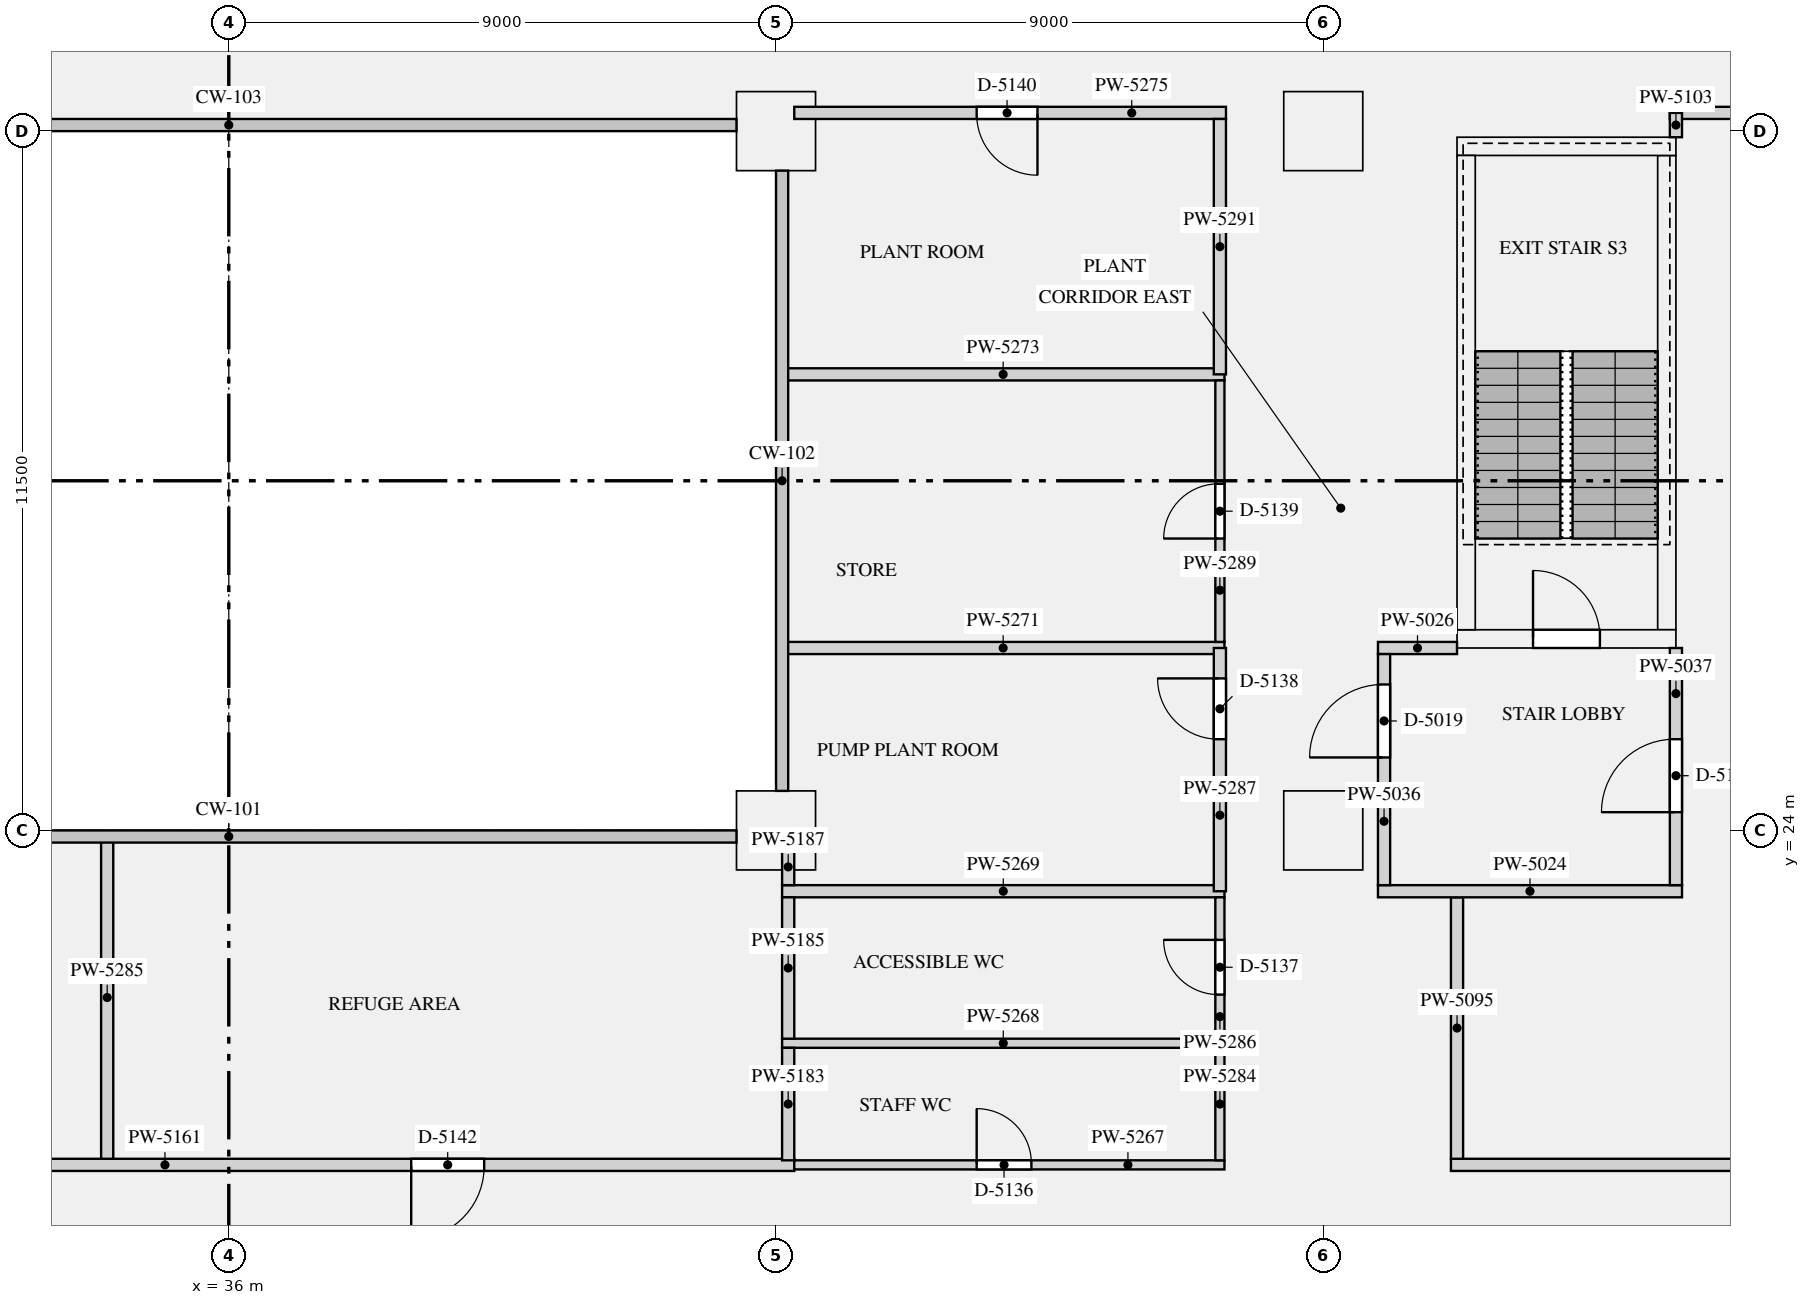
"""IFC4 building model, lengths in metres.
Left out: names, types, materials, properties, quantities, classifications, styles, units other than length and angle.
Written with IfcOpenShell. Run it as: python <this file> out.ifc"""

import sys

from ifc_helpers import new_model, si_unit, direction, frame, frame_2d, origin, origin_2d, place, context, subcontext, project, spatial, rectangle, extrude, element, fill, save


model = new_model("IFC4")
c1 = context("Model", 3, precision=1e-05, world=origin(), true_north=direction((0.0, 1.0)))
c2 = subcontext(c1, "Body", "Model", "MODEL_VIEW")
j1 = project(units=[si_unit("LENGTHUNIT", "METRE"), si_unit("PLANEANGLEUNIT", "RADIAN")], contexts=[c1])
p1 = place(None, origin())
s1 = spatial("IfcSite", under=j1, at=p1, CompositionType="ELEMENT")
p2 = place(p1, origin())
s2 = spatial("IfcBuilding", under=s1, at=p2, CompositionType="ELEMENT")
p3 = place(p2, frame((0.0, 0.0, 137.1)))
s3 = spatial("IfcBuildingStorey", under=s2, at=p3, CompositionType="ELEMENT", Elevation=137.1)
for number, where, z_axis, x_axis in (
    (1, (45.0, 24.0, 0.0), (0.0, 0.0, 1.0), (1.0, 0.0, 0.0)),
    (2, (54.0, 24.0, 0.0), (0.0, 0.0, 1.0), (1.0, 0.0, 0.0)),
    (3, (45.0, 35.5, 0.0), (0.0, 0.0, 1.0), (1.0, 0.0, 0.0)),
    (4, (54.0, 35.5, 0.0), (0.0, 0.0, 1.0), (1.0, 0.0, 0.0)),
):
    element("IfcColumn", number, at=place(p3, frame(where, z_axis=z_axis, x_axis=x_axis)), inside=s3, PredefinedType="COLUMN", context=c2, shape_type="SweptSolid", body=[
        extrude(rectangle(XDim=1.3, YDim=1.3, at=origin_2d()), origin(), (0.0, 0.0, 1.0), 4.2),
    ])
p4 = place(p3, frame((56.2, 27.15, 0.0), z_axis=(0.0, 0.0, 1.0), x_axis=(1.0, 0.0, 0.0)))
e5 = element("IfcWall", 5, at=p4, inside=s3, PredefinedType="SHEAR", context=c2, shape_type="SweptSolid", body=[
    extrude(rectangle(XDim=3.6, YDim=0.3, at=frame_2d((1.8, 0.0))), origin(), (0.0, 0.0, 1.0), 4.2),
])
p5 = place(p4, frame((1.25, 0.0, 0.0)))
e6 = element("IfcOpeningElement", 6, at=p5, cuts=e5, PredefinedType="OPENING", context=c2, shape_type="SweptSolid", body=[
    extrude(rectangle(XDim=1.1, YDim=2.1, at=frame_2d((0.55, 1.05))), frame((0.0, 0.16, 0.0), z_axis=(0.0, -1.0, 0.0), x_axis=(1.0, 0.0, 0.0)), (0.0, 0.0, 1.0), 0.32),
])
p6 = place(p3, frame((56.2, 35.25, 0.0), z_axis=(0.0, 0.0, 1.0), x_axis=(1.0, 0.0, 0.0)))
e7 = element("IfcWall", 7, at=p6, inside=s3, PredefinedType="SHEAR", context=c2, shape_type="SweptSolid", body=[
    extrude(rectangle(XDim=3.6, YDim=0.3, at=frame_2d((1.8, 0.0))), origin(), (0.0, 0.0, 1.0), 4.2),
])
for number, where, z_axis, x_axis in (
    (8, (56.35, 27.3, 0.0), (0.0, 0.0, 1.0), (0.0, 1.0, 0.0)),
    (9, (59.65, 27.3, 0.0), (0.0, 0.0, 1.0), (0.0, 1.0, 0.0)),
):
    element("IfcWall", number, at=place(p3, frame(where, z_axis=z_axis, x_axis=x_axis)), inside=s3, PredefinedType="SHEAR", context=c2, shape_type="SweptSolid", body=[
        extrude(rectangle(XDim=7.8, YDim=0.3, at=frame_2d((3.9, 0.0))), origin(), (0.0, 0.0, 1.0), 4.2),
    ])
p7 = place(p3, frame((54.9, 23.0, 0.0), z_axis=(0.0, 0.0, 1.0), x_axis=(1.0, 0.0, 0.0)))
e10 = element("IfcWall", 10, at=p7, inside=s3, PredefinedType="PARTITIONING", context=c2, shape_type="SweptSolid", body=[
    extrude(rectangle(XDim=5.0, YDim=0.2, at=frame_2d((2.5, 0.0))), origin(), (0.0, 0.0, 1.0), 3.7),
])
p8 = place(p3, frame((54.9, 27.0, 0.0), z_axis=(0.0, 0.0, 1.0), x_axis=(1.0, 0.0, 0.0)))
e11 = element("IfcWall", 11, at=p8, inside=s3, PredefinedType="PARTITIONING", context=c2, shape_type="SweptSolid", body=[
    extrude(rectangle(XDim=1.3, YDim=0.2, at=frame_2d((0.65, 0.0))), origin(), (0.0, 0.0, 1.0), 3.7),
])
p9 = place(p3, frame((55.0, 23.1, 0.0), z_axis=(0.0, 0.0, 1.0), x_axis=(0.0, 1.0, 0.0)))
e12 = element("IfcWall", 12, at=p9, inside=s3, PredefinedType="PARTITIONING", context=c2, shape_type="SweptSolid", body=[
    extrude(rectangle(XDim=3.8, YDim=0.2, at=frame_2d((1.9, 0.0))), origin(), (0.0, 0.0, 1.0), 3.7),
])
p10 = place(p9, frame((2.1, 0.0, 0.0)))
e13 = element("IfcOpeningElement", 13, at=p10, cuts=e12, PredefinedType="OPENING", context=c2, shape_type="SweptSolid", body=[
    extrude(rectangle(XDim=1.2, YDim=2.1, at=frame_2d((0.6, 1.05))), frame((0.0, 0.11, 0.0), z_axis=(0.0, -1.0, 0.0), x_axis=(1.0, 0.0, 0.0)), (0.0, 0.0, 1.0), 0.22),
])
p11 = place(p3, frame((59.8, 23.1, 0.0), z_axis=(0.0, 0.0, 1.0), x_axis=(0.0, 1.0, 0.0)))
e14 = element("IfcWall", 14, at=p11, inside=s3, PredefinedType="PARTITIONING", context=c2, shape_type="SweptSolid", body=[
    extrude(rectangle(XDim=3.9, YDim=0.2, at=frame_2d((1.95, 0.0))), origin(), (0.0, 0.0, 1.0), 3.7),
])
p12 = place(p11, frame((1.2, 0.0, 0.0)))
e15 = element("IfcOpeningElement", 15, at=p12, cuts=e14, PredefinedType="OPENING", context=c2, shape_type="SweptSolid", body=[
    extrude(rectangle(XDim=1.2, YDim=2.1, at=frame_2d((0.6, 1.05))), frame((0.0, 0.11, 0.0), z_axis=(0.0, -1.0, 0.0), x_axis=(1.0, 0.0, 0.0)), (0.0, 0.0, 1.0), 0.22),
])
p13 = place(p3, frame((26.7, 18.5, 0.0), z_axis=(0.0, 0.0, 1.0), x_axis=(1.0, 0.0, 0.0)))
e16 = element("IfcWall", 16, at=p13, inside=s3, PredefinedType="PARTITIONING", context=c2, shape_type="SweptSolid", body=[
    extrude(rectangle(XDim=18.6, YDim=0.2, at=frame_2d((9.3, 0.0))), origin(), (0.0, 0.0, 1.0), 3.7),
])
p14 = place(p13, frame((3.2, 0.0, 0.0)))
e17 = element("IfcOpeningElement", 17, at=p14, cuts=e16, PredefinedType="OPENING", context=c2, shape_type="SweptSolid", body=[
    extrude(rectangle(XDim=1.0, YDim=2.1, at=frame_2d((0.5, 1.05))), frame((0.0, 0.11, 0.0), z_axis=(0.0, -1.0, 0.0), x_axis=(1.0, 0.0, 0.0)), (0.0, 0.0, 1.0), 0.22),
])
p15 = place(p13, frame((12.3, 0.0, 0.0)))
e18 = element("IfcOpeningElement", 18, at=p15, cuts=e16, PredefinedType="OPENING", context=c2, shape_type="SweptSolid", body=[
    extrude(rectangle(XDim=1.2, YDim=2.1, at=frame_2d((0.6, 1.05))), frame((0.0, 0.11, 0.0), z_axis=(0.0, -1.0, 0.0), x_axis=(1.0, 0.0, 0.0)), (0.0, 0.0, 1.0), 0.22),
])
p16 = place(p3, frame((56.1, 18.5, 0.0), z_axis=(0.0, 0.0, 1.0), x_axis=(1.0, 0.0, 0.0)))
e19 = element("IfcWall", 19, at=p16, inside=s3, PredefinedType="PARTITIONING", context=c2, shape_type="SweptSolid", body=[
    extrude(rectangle(XDim=17.81, YDim=0.2, at=frame_2d((8.905, 0.0))), origin(), (0.0, 0.0, 1.0), 3.7),
])
p17 = place(p3, frame((45.3, 18.5, 0.0), z_axis=(0.0, 0.0, 1.0), x_axis=(1.0, 0.0, 0.0)))
e20 = element("IfcWall", 20, at=p17, inside=s3, PredefinedType="PARTITIONING", context=c2, shape_type="SweptSolid", body=[
    extrude(rectangle(XDim=7.075, YDim=0.15, at=frame_2d((3.538, 0.0))), origin(), (0.0, 0.0, 1.0), 3.7),
])
p18 = place(p17, frame((3.0, 0.0, 0.0)))
e21 = element("IfcOpeningElement", 21, at=p18, cuts=e20, PredefinedType="OPENING", context=c2, shape_type="SweptSolid", body=[
    extrude(rectangle(XDim=0.9, YDim=2.1, at=frame_2d((0.45, 1.05))), frame((0.0, 0.085, 0.0), z_axis=(0.0, -1.0, 0.0), x_axis=(1.0, 0.0, 0.0)), (0.0, 0.0, 1.0), 0.17),
])
p19 = place(p3, frame((45.1, 20.5, 0.0), z_axis=(0.0, 0.0, 1.0), x_axis=(1.0, 0.0, 0.0)))
e22 = element("IfcWall", 22, at=p19, inside=s3, PredefinedType="PARTITIONING", context=c2, shape_type="SweptSolid", body=[
    extrude(rectangle(XDim=7.275, YDim=0.15, at=frame_2d((3.637, 0.0))), origin(), (0.0, 0.0, 1.0), 3.7),
])
p20 = place(p3, frame((45.1, 23.0, 0.0), z_axis=(0.0, 0.0, 1.0), x_axis=(1.0, 0.0, 0.0)))
e23 = element("IfcWall", 23, at=p20, inside=s3, PredefinedType="PARTITIONING", context=c2, shape_type="SweptSolid", body=[
    extrude(rectangle(XDim=7.275, YDim=0.2, at=frame_2d((3.637, 0.0))), origin(), (0.0, 0.0, 1.0), 3.7),
])
for number, where, z_axis, x_axis in (
    (24, (45.096, 27.0, 0.0), (0.0, 0.0, 1.0), (1.0, 0.0, 0.0)),
    (25, (45.096, 31.5, 0.0), (0.0, 0.0, 1.0), (1.0, 0.0, 0.0)),
):
    element("IfcWall", number, at=place(p3, frame(where, z_axis=z_axis, x_axis=x_axis)), inside=s3, PredefinedType="PARTITIONING", context=c2, shape_type="SweptSolid", body=[
        extrude(rectangle(XDim=7.279, YDim=0.2, at=frame_2d((3.64, 0.0))), origin(), (0.0, 0.0, 1.0), 3.7),
    ])
p21 = place(p3, frame((45.3, 35.8, 0.0), z_axis=(0.0, 0.0, 1.0), x_axis=(1.0, 0.0, 0.0)))
e26 = element("IfcWall", 26, at=p21, inside=s3, PredefinedType="PARTITIONING", context=c2, shape_type="SweptSolid", body=[
    extrude(rectangle(XDim=7.1, YDim=0.2, at=frame_2d((3.55, 0.0))), origin(), (0.0, 0.0, 1.0), 3.7),
])
p22 = place(p21, frame((3.0, 0.0, 0.0)))
e27 = element("IfcOpeningElement", 27, at=p22, cuts=e26, PredefinedType="OPENING", context=c2, shape_type="SweptSolid", body=[
    extrude(rectangle(XDim=1.0, YDim=2.1, at=frame_2d((0.5, 1.05))), frame((0.0, 0.11, 0.0), z_axis=(0.0, -1.0, 0.0), x_axis=(1.0, 0.0, 0.0)), (0.0, 0.0, 1.0), 0.22),
])
p23 = place(p3, frame((59.7, 35.8, 0.0), z_axis=(0.0, 0.0, 1.0), x_axis=(1.0, 0.0, 0.0)))
e28 = element("IfcWall", 28, at=p23, inside=s3, PredefinedType="PARTITIONING", context=c2, shape_type="SweptSolid", body=[
    extrude(rectangle(XDim=16.71, YDim=0.2, at=frame_2d((8.355, 0.0))), origin(), (0.0, 0.0, 1.0), 3.7),
])
p24 = place(p3, frame((45.2, 18.575, 0.0), z_axis=(0.0, 0.0, 1.0), x_axis=(0.0, 1.0, 0.0)))
e29 = element("IfcWall", 29, at=p24, inside=s3, PredefinedType="PARTITIONING", context=c2, shape_type="SweptSolid", body=[
    extrude(rectangle(XDim=1.85, YDim=0.2, at=frame_2d((0.925, 0.0))), origin(), (0.0, 0.0, 1.0), 3.7),
])
p25 = place(p3, frame((52.3, 18.575, 0.0), z_axis=(0.0, 0.0, 1.0), x_axis=(0.0, 1.0, 0.0)))
e30 = element("IfcWall", 30, at=p25, inside=s3, PredefinedType="PARTITIONING", context=c2, shape_type="SweptSolid", body=[
    extrude(rectangle(XDim=1.85, YDim=0.15, at=frame_2d((0.925, 0.0))), origin(), (0.0, 0.0, 1.0), 3.7),
])
p26 = place(p3, frame((34.0, 18.6, 0.0), z_axis=(0.0, 0.0, 1.0), x_axis=(0.0, 1.0, 0.0)))
e31 = element("IfcWall", 31, at=p26, inside=s3, PredefinedType="PARTITIONING", context=c2, shape_type="SweptSolid", body=[
    extrude(rectangle(XDim=5.304, YDim=0.2, at=frame_2d((2.652, 0.0))), origin(), (0.0, 0.0, 1.0), 3.7),
])
p27 = place(p3, frame((56.2, 18.6, 0.0), z_axis=(0.0, 0.0, 1.0), x_axis=(0.0, 1.0, 0.0)))
e32 = element("IfcWall", 32, at=p27, inside=s3, PredefinedType="PARTITIONING", context=c2, shape_type="SweptSolid", body=[
    extrude(rectangle(XDim=4.3, YDim=0.2, at=frame_2d((2.15, 0.0))), origin(), (0.0, 0.0, 1.0), 3.7),
])
p28 = place(p3, frame((45.2, 20.575, 0.0), z_axis=(0.0, 0.0, 1.0), x_axis=(0.0, 1.0, 0.0)))
e33 = element("IfcWall", 33, at=p28, inside=s3, PredefinedType="PARTITIONING", context=c2, shape_type="SweptSolid", body=[
    extrude(rectangle(XDim=2.325, YDim=0.2, at=frame_2d((1.163, 0.0))), origin(), (0.0, 0.0, 1.0), 3.7),
])
p29 = place(p3, frame((52.3, 20.575, 0.0), z_axis=(0.0, 0.0, 1.0), x_axis=(0.0, 1.0, 0.0)))
e34 = element("IfcWall", 34, at=p29, inside=s3, PredefinedType="PARTITIONING", context=c2, shape_type="SweptSolid", body=[
    extrude(rectangle(XDim=2.325, YDim=0.15, at=frame_2d((1.163, 0.0))), origin(), (0.0, 0.0, 1.0), 3.7),
])
p30 = place(p29, frame((0.725, 0.0, 0.0)))
e35 = element("IfcOpeningElement", 35, at=p30, cuts=e34, PredefinedType="OPENING", context=c2, shape_type="SweptSolid", body=[
    extrude(rectangle(XDim=0.9, YDim=2.1, at=frame_2d((0.45, 1.05))), frame((0.0, 0.085, 0.0), z_axis=(0.0, -1.0, 0.0), x_axis=(1.0, 0.0, 0.0)), (0.0, 0.0, 1.0), 0.17),
])
p31 = place(p3, frame((52.3, 23.0, 0.0), z_axis=(0.0, 0.0, 1.0), x_axis=(0.0, 1.0, 0.0)))
e36 = element("IfcWall", 36, at=p31, inside=s3, PredefinedType="PARTITIONING", context=c2, shape_type="SweptSolid", body=[
    extrude(rectangle(XDim=4.0, YDim=0.2, at=frame_2d((2.0, 0.0))), origin(), (0.0, 0.0, 1.0), 3.7),
])
p32 = place(p31, frame((2.5, 0.0, 0.0)))
e37 = element("IfcOpeningElement", 37, at=p32, cuts=e36, PredefinedType="OPENING", context=c2, shape_type="SweptSolid", body=[
    extrude(rectangle(XDim=1.0, YDim=2.1, at=frame_2d((0.5, 1.05))), frame((0.0, 0.11, 0.0), z_axis=(0.0, -1.0, 0.0), x_axis=(1.0, 0.0, 0.0)), (0.0, 0.0, 1.0), 0.22),
])
p33 = place(p3, frame((45.2, 23.1, 0.0), z_axis=(0.0, 0.0, 1.0), x_axis=(0.0, 1.0, 0.0)))
e38 = element("IfcWall", 38, at=p33, inside=s3, PredefinedType="PARTITIONING", context=c2, shape_type="SweptSolid", body=[
    extrude(rectangle(XDim=0.6, YDim=0.2, at=frame_2d((0.3, 0.0))), origin(), (0.0, 0.0, 1.0), 3.7),
])
p34 = place(p3, frame((52.3, 27.1, 0.0), z_axis=(0.0, 0.0, 1.0), x_axis=(0.0, 1.0, 0.0)))
e39 = element("IfcWall", 39, at=p34, inside=s3, PredefinedType="PARTITIONING", context=c2, shape_type="SweptSolid", body=[
    extrude(rectangle(XDim=4.3, YDim=0.15, at=frame_2d((2.15, 0.0))), origin(), (0.0, 0.0, 1.0), 3.7),
])
p35 = place(p34, frame((1.7, 0.0, 0.0)))
e40 = element("IfcOpeningElement", 40, at=p35, cuts=e39, PredefinedType="OPENING", context=c2, shape_type="SweptSolid", body=[
    extrude(rectangle(XDim=0.9, YDim=2.1, at=frame_2d((0.45, 1.05))), frame((0.0, 0.085, 0.0), z_axis=(0.0, -1.0, 0.0), x_axis=(1.0, 0.0, 0.0)), (0.0, 0.0, 1.0), 0.17),
])
p36 = place(p3, frame((52.3, 31.5, 0.0), z_axis=(0.0, 0.0, 1.0), x_axis=(0.0, 1.0, 0.0)))
e41 = element("IfcWall", 41, at=p36, inside=s3, PredefinedType="PARTITIONING", context=c2, shape_type="SweptSolid", body=[
    extrude(rectangle(XDim=4.2, YDim=0.2, at=frame_2d((2.1, 0.0))), origin(), (0.0, 0.0, 1.0), 3.7),
])
p37 = place(p3, frame((59.8, 35.4, 0.0), z_axis=(0.0, 0.0, 1.0), x_axis=(0.0, 1.0, 0.0)))
e42 = element("IfcWall", 42, at=p37, inside=s3, PredefinedType="PARTITIONING", context=c2, shape_type="SweptSolid", body=[
    extrude(rectangle(XDim=0.4, YDim=0.2, at=frame_2d((0.2, 0.0))), origin(), (0.0, 0.0, 1.0), 3.7),
])
p38 = place(p5, origin())
e43 = element("IfcDoor", 43, at=p38, inside=s3, OperationType="SINGLE_SWING_LEFT", PredefinedType="DOOR", context=c2, shape_type="SweptSolid", body=[
    extrude(rectangle(XDim=1.1, YDim=2.1, at=frame_2d((0.55, 1.05))), frame((0.0, 0.025, 0.0), z_axis=(0.0, -1.0, 0.0), x_axis=(1.0, 0.0, 0.0)), (0.0, 0.0, 1.0), 0.05),
])
fill(e6, e43)
p39 = place(p10, origin())
e44 = element("IfcDoor", 44, at=p39, inside=s3, OperationType="SINGLE_SWING_LEFT", PredefinedType="DOOR", context=c2, shape_type="SweptSolid", body=[
    extrude(rectangle(XDim=1.2, YDim=2.1, at=frame_2d((0.6, 1.05))), frame((0.0, 0.025, 0.0), z_axis=(0.0, -1.0, 0.0), x_axis=(1.0, 0.0, 0.0)), (0.0, 0.0, 1.0), 0.05),
])
fill(e13, e44)
p40 = place(p18, origin())
e45 = element("IfcDoor", 45, at=p40, inside=s3, OperationType="SINGLE_SWING_LEFT", PredefinedType="DOOR", context=c2, shape_type="SweptSolid", body=[
    extrude(rectangle(XDim=0.9, YDim=2.1, at=frame_2d((0.45, 1.05))), frame((0.0, 0.025, 0.0), z_axis=(0.0, -1.0, 0.0), x_axis=(1.0, 0.0, 0.0)), (0.0, 0.0, 1.0), 0.05),
])
fill(e21, e45)
p41 = place(p30, origin())
e46 = element("IfcDoor", 46, at=p41, inside=s3, OperationType="SINGLE_SWING_RIGHT", PredefinedType="DOOR", context=c2, shape_type="SweptSolid", body=[
    extrude(rectangle(XDim=0.9, YDim=2.1, at=frame_2d((0.45, 1.05))), frame((0.0, 0.025, 0.0), z_axis=(0.0, -1.0, 0.0), x_axis=(1.0, 0.0, 0.0)), (0.0, 0.0, 1.0), 0.05),
])
fill(e35, e46)
p42 = place(p32, origin())
e47 = element("IfcDoor", 47, at=p42, inside=s3, OperationType="SINGLE_SWING_RIGHT", PredefinedType="DOOR", context=c2, shape_type="SweptSolid", body=[
    extrude(rectangle(XDim=1.0, YDim=2.1, at=frame_2d((0.5, 1.05))), frame((0.0, 0.025, 0.0), z_axis=(0.0, -1.0, 0.0), x_axis=(1.0, 0.0, 0.0)), (0.0, 0.0, 1.0), 0.05),
])
fill(e37, e47)
p43 = place(p35, origin())
e48 = element("IfcDoor", 48, at=p43, inside=s3, OperationType="SINGLE_SWING_LEFT", PredefinedType="DOOR", context=c2, shape_type="SweptSolid", body=[
    extrude(rectangle(XDim=0.9, YDim=2.1, at=frame_2d((0.45, 1.05))), frame((0.0, 0.025, 0.0), z_axis=(0.0, -1.0, 0.0), x_axis=(1.0, 0.0, 0.0)), (0.0, 0.0, 1.0), 0.05),
])
fill(e40, e48)
p44 = place(p22, frame((1.0, 0.0, 0.0), z_axis=(0.0, 0.0, 1.0), x_axis=(-1.0, 0.0, 0.0)))
e49 = element("IfcDoor", 49, at=p44, inside=s3, OperationType="SINGLE_SWING_LEFT", PredefinedType="DOOR", context=c2, shape_type="SweptSolid", body=[
    extrude(rectangle(XDim=1.0, YDim=2.1, at=frame_2d((0.5, 1.05))), frame((0.0, 0.025, 0.0), z_axis=(0.0, -1.0, 0.0), x_axis=(1.0, 0.0, 0.0)), (0.0, 0.0, 1.0), 0.05),
])
fill(e27, e49)
p45 = place(p15, frame((1.2, 0.0, 0.0), z_axis=(0.0, 0.0, 1.0), x_axis=(-1.0, 0.0, 0.0)))
e50 = element("IfcDoor", 50, at=p45, inside=s3, OperationType="SINGLE_SWING_RIGHT", PredefinedType="DOOR", context=c2, shape_type="SweptSolid", body=[
    extrude(rectangle(XDim=1.2, YDim=2.1, at=frame_2d((0.6, 1.05))), frame((0.0, 0.025, 0.0), z_axis=(0.0, -1.0, 0.0), x_axis=(1.0, 0.0, 0.0)), (0.0, 0.0, 1.0), 0.05),
])
fill(e18, e50)
p46 = place(p12, origin())
e51 = element("IfcDoor", 51, at=p46, inside=s3, OperationType="SINGLE_SWING_LEFT", PredefinedType="DOOR", context=c2, shape_type="SweptSolid", body=[
    extrude(rectangle(XDim=1.2, YDim=2.1, at=frame_2d((0.6, 1.05))), frame((0.0, 0.025, 0.0), z_axis=(0.0, -1.0, 0.0), x_axis=(1.0, 0.0, 0.0)), (0.0, 0.0, 1.0), 0.05),
])
fill(e15, e51)
save(model, sys.argv[1])
